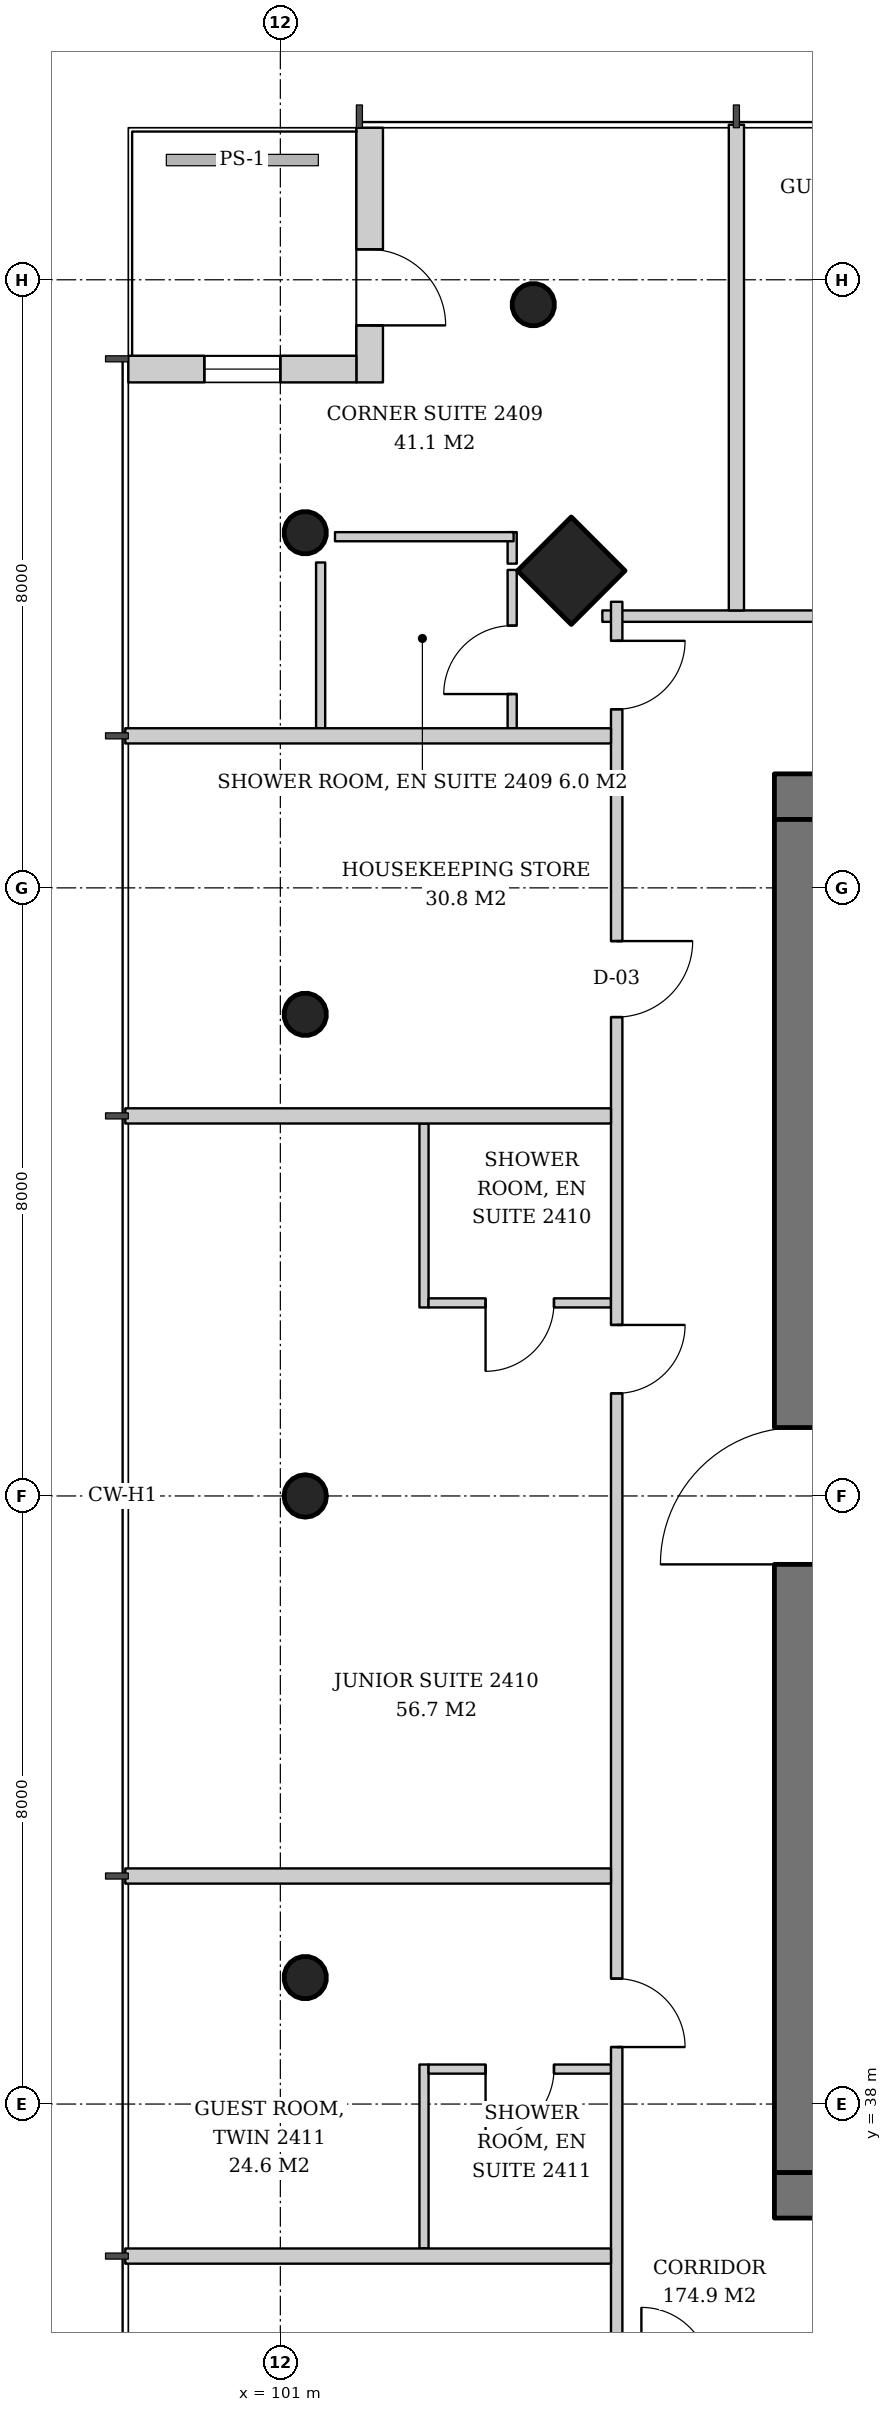
"""IFC4 building model, lengths in metres.
Left out: names, types, materials, properties, quantities, classifications, styles, units other than length and angle.
Written with IfcOpenShell. Run it as: python <this file> out.ifc"""

import sys

from ifc_helpers import new_model, si_unit, direction, frame, frame_2d, origin, origin_2d, place, context, subcontext, project, spatial, rectangle, hollow_circle, extrude, element, fill, save


model = new_model("IFC4")
c1 = context("Model", 3, precision=1e-05, world=origin(), true_north=direction((0.0, 1.0)))
c2 = subcontext(c1, "Body", "Model", "MODEL_VIEW")
j1 = project(units=[si_unit("LENGTHUNIT", "METRE"), si_unit("PLANEANGLEUNIT", "RADIAN")], contexts=[c1])
p1 = place(None, origin())
s1 = spatial("IfcSite", under=j1, at=p1, CompositionType="ELEMENT")
p2 = place(p1, origin())
s2 = spatial("IfcBuilding", under=s1, at=p2, CompositionType="ELEMENT")
p3 = place(p2, frame((0.0, 0.0, 97.0)))
s3 = spatial("IfcBuildingStorey", under=s2, at=p3, CompositionType="ELEMENT", Elevation=97.0)
p4 = place(p3, frame((104.776, 58.224, 0.0), z_axis=(0.043029647111, -0.043029647111, 0.998146732169), x_axis=(0.707106781187, 0.707106781187, 0.0)))
e1 = element("IfcColumn", 1, at=p4, inside=s3, PredefinedType="COLUMN", context=c2, shape_type="SweptSolid", body=[
    extrude(rectangle(XDim=1.0, YDim=1.0, at=origin_2d()), origin(), (0.0, 0.0, 1.0), 3.807),
])
for number, where, z_axis, x_axis in (
    (2, (104.276, 61.724, 0.0), (0.043, -0.043, 0.998), (0.707, 0.707, 0.0)),
    (3, (101.276, 58.724, 0.0), (0.043, -0.043, 0.998), (0.707, 0.707, 0.0)),
):
    element("IfcColumn", number, at=place(p3, frame(where, z_axis=z_axis, x_axis=x_axis)), inside=s3, PredefinedType="COLUMN", context=c2, shape_type="SweptSolid", body=[
        extrude(hollow_circle(Radius=0.28, WallThickness=0.02, at=origin_2d()), origin(), (0.0, 0.0, 1.0), 3.807),
    ])
p5 = place(p3, frame((101.276, 52.362, 0.0), z_axis=(0.043059584825, -0.021497706284, 0.998841188968), x_axis=(0.446680166538, 0.894693706707, 0.0)))
e4 = element("IfcColumn", 4, at=p5, inside=s3, PredefinedType="COLUMN", context=c2, shape_type="SweptSolid", body=[
    extrude(hollow_circle(Radius=0.28, WallThickness=0.02, at=origin_2d()), origin(), (0.0, 0.0, 1.0), 3.804),
])
p6 = place(p3, frame((101.276, 46.0, 0.0), z_axis=(0.043069538298, 0.0, 0.999072076915), x_axis=(0.0, 1.0, 0.0)))
e5 = element("IfcColumn", 5, at=p6, inside=s3, PredefinedType="COLUMN", context=c2, shape_type="SweptSolid", body=[
    extrude(hollow_circle(Radius=0.28, WallThickness=0.02, at=origin_2d()), origin(), (0.0, 0.0, 1.0), 3.803),
])
p7 = place(p3, frame((101.276, 39.638, 0.0), z_axis=(0.043059584825, 0.021497706284, 0.998841188968), x_axis=(-0.446680166538, 0.894693706707, 0.0)))
e6 = element("IfcColumn", 6, at=p7, inside=s3, PredefinedType="COLUMN", context=c2, shape_type="SweptSolid", body=[
    extrude(hollow_circle(Radius=0.28, WallThickness=0.02, at=origin_2d()), origin(), (0.0, 0.0, 1.0), 3.804),
])
p8 = place(p3, frame((107.5, 36.8, 0.0), z_axis=(0.0, 0.0, 1.0), x_axis=(1.0, 0.0, 0.0)))
e7 = element("IfcWall", 7, at=p8, inside=s3, PredefinedType="SHEAR", context=c2, shape_type="SweptSolid", body=[
    extrude(rectangle(XDim=19.0, YDim=0.6, at=frame_2d((9.5, 0.0))), origin(), (0.0, 0.0, 1.0), 3.8),
])
p9 = place(p8, frame((3.9, 0.0, 0.0)))
e8 = element("IfcOpeningElement", 8, at=p9, cuts=e7, PredefinedType="OPENING", context=c2, shape_type="SweptSolid", body=[
    extrude(rectangle(XDim=1.0, YDim=2.1, at=frame_2d((0.5, 1.05))), frame((0.0, 0.31, 0.0), z_axis=(0.0, -1.0, 0.0), x_axis=(1.0, 0.0, 0.0)), (0.0, 0.0, 1.0), 0.62),
])
p10 = place(p8, frame((14.153, 0.0, 0.0)))
e9 = element("IfcOpeningElement", 9, at=p10, cuts=e7, PredefinedType="OPENING", context=c2, shape_type="SweptSolid", body=[
    extrude(rectangle(XDim=1.0, YDim=2.1, at=frame_2d((0.5, 1.05))), frame((0.0, 0.31, 0.0), z_axis=(0.0, -1.0, 0.0), x_axis=(1.0, 0.0, 0.0)), (0.0, 0.0, 1.0), 0.62),
])
p11 = place(p8, frame((16.2, 0.0, 0.0)))
e10 = element("IfcOpeningElement", 10, at=p11, cuts=e7, PredefinedType="OPENING", context=c2, shape_type="SweptSolid", body=[
    extrude(rectangle(XDim=1.0, YDim=2.1, at=frame_2d((0.5, 1.05))), frame((0.0, 0.31, 0.0), z_axis=(0.0, -1.0, 0.0), x_axis=(1.0, 0.0, 0.0)), (0.0, 0.0, 1.0), 0.62),
])
p12 = place(p3, frame((107.5, 55.2, 0.0), z_axis=(0.0, 0.0, 1.0), x_axis=(1.0, 0.0, 0.0)))
e11 = element("IfcWall", 11, at=p12, inside=s3, PredefinedType="SHEAR", context=c2, shape_type="SweptSolid", body=[
    extrude(rectangle(XDim=19.0, YDim=0.6, at=frame_2d((9.5, 0.0))), origin(), (0.0, 0.0, 1.0), 3.8),
])
p13 = place(p12, frame((14.14, 0.0, 0.0)))
e12 = element("IfcOpeningElement", 12, at=p13, cuts=e11, PredefinedType="OPENING", context=c2, shape_type="SweptSolid", body=[
    extrude(rectangle(XDim=1.0, YDim=2.1, at=frame_2d((0.5, 1.05))), frame((0.0, 0.31, 0.0), z_axis=(0.0, -1.0, 0.0), x_axis=(1.0, 0.0, 0.0)), (0.0, 0.0, 1.0), 0.62),
])
p14 = place(p12, frame((2.425, 0.0, 0.0)))
e13 = element("IfcOpeningElement", 13, at=p14, cuts=e11, PredefinedType="OPENING", context=c2, shape_type="SweptSolid", body=[
    extrude(rectangle(XDim=1.0, YDim=2.1, at=frame_2d((0.5, 1.05))), frame((0.0, 0.31, 0.0), z_axis=(0.0, -1.0, 0.0), x_axis=(1.0, 0.0, 0.0)), (0.0, 0.0, 1.0), 0.62),
])
p15 = place(p3, frame((107.8, 37.1, 0.0), z_axis=(0.0, 0.0, 1.0), x_axis=(0.0, 1.0, 0.0)))
e14 = element("IfcWall", 14, at=p15, inside=s3, PredefinedType="SHEAR", context=c2, shape_type="SweptSolid", body=[
    extrude(rectangle(XDim=17.8, YDim=0.6, at=frame_2d((8.9, 0.0))), origin(), (0.0, 0.0, 1.0), 3.8),
])
p16 = place(p15, frame((8.0, 0.0, 0.0)))
e15 = element("IfcOpeningElement", 15, at=p16, cuts=e14, PredefinedType="OPENING", context=c2, shape_type="SweptSolid", body=[
    extrude(rectangle(XDim=1.8, YDim=2.4, at=frame_2d((0.9, 1.2))), frame((0.0, 0.31, 0.0), z_axis=(0.0, -1.0, 0.0), x_axis=(1.0, 0.0, 0.0)), (0.0, 0.0, 1.0), 0.62),
])
p17 = place(p3, frame((102.175, 64.0, 0.0), z_axis=(0.0, 0.0, 1.0), x_axis=(0.0, -1.0, 0.0)))
e16 = element("IfcWall", 16, at=p17, inside=s3, PredefinedType="SOLIDWALL", context=c2, shape_type="SweptSolid", body=[
    extrude(rectangle(XDim=3.35, YDim=0.35, at=frame_2d((1.675, 0.0))), origin(), (0.0, 0.0, 1.0), 3.6),
])
p18 = place(p17, frame((1.6, 0.0, 0.0)))
e17 = element("IfcOpeningElement", 17, at=p18, cuts=e16, PredefinedType="OPENING", context=c2, shape_type="SweptSolid", body=[
    extrude(rectangle(XDim=1.0, YDim=2.4, at=frame_2d((0.5, 1.2))), frame((0.0, 0.185, 0.0), z_axis=(0.0, -1.0, 0.0), x_axis=(1.0, 0.0, 0.0)), (0.0, 0.0, 1.0), 0.37),
])
p19 = place(p3, frame((102.0, 60.825, 0.0), z_axis=(0.0, 0.0, 1.0), x_axis=(-1.0, 0.0, 0.0)))
e18 = element("IfcWall", 18, at=p19, inside=s3, PredefinedType="SOLIDWALL", context=c2, shape_type="SweptSolid", body=[
    extrude(rectangle(XDim=3.0, YDim=0.35, at=frame_2d((1.5, 0.0))), origin(), (0.0, 0.0, 1.0), 3.6),
])
p20 = place(p19, frame((1.0, 0.0, 0.9)))
e19 = element("IfcOpeningElement", 19, at=p20, cuts=e18, PredefinedType="OPENING", context=c2, shape_type="SweptSolid", body=[
    extrude(rectangle(XDim=1.0, YDim=2.4, at=frame_2d((0.5, 1.2))), frame((0.0, 0.185, 0.0), z_axis=(0.0, -1.0, 0.0), x_axis=(1.0, 0.0, 0.0)), (0.0, 0.0, 1.0), 0.37),
])
p21 = place(p3, frame((128.764, 57.575, 0.0), z_axis=(0.0, 0.0, 1.0), x_axis=(-1.0, 0.0, 0.0)))
e20 = element("IfcWall", 20, at=p21, inside=s3, PredefinedType="PARTITIONING", context=c2, shape_type="SweptSolid", body=[
    extrude(rectangle(XDim=23.527, YDim=0.15, at=frame_2d((11.764, 0.0))), origin(), (0.0, 0.0, 1.0), 2.9),
])
p22 = place(p21, frame((0.514, 0.0, 0.0)))
e21 = element("IfcOpeningElement", 21, at=p22, cuts=e20, PredefinedType="OPENING", context=c2, shape_type="SweptSolid", body=[
    extrude(rectangle(XDim=0.9, YDim=2.1, at=frame_2d((0.45, 1.05))), frame((0.0, 0.085, 0.0), z_axis=(0.0, -1.0, 0.0), x_axis=(1.0, 0.0, 0.0)), (0.0, 0.0, 1.0), 0.17),
])
p23 = place(p21, frame((3.114, 0.0, 0.0)))
e22 = element("IfcOpeningElement", 22, at=p23, cuts=e20, PredefinedType="OPENING", context=c2, shape_type="SweptSolid", body=[
    extrude(rectangle(XDim=0.9, YDim=2.1, at=frame_2d((0.45, 1.05))), frame((0.0, 0.085, 0.0), z_axis=(0.0, -1.0, 0.0), x_axis=(1.0, 0.0, 0.0)), (0.0, 0.0, 1.0), 0.17),
])
p24 = place(p21, frame((9.514, 0.0, 0.0)))
e23 = element("IfcOpeningElement", 23, at=p24, cuts=e20, PredefinedType="OPENING", context=c2, shape_type="SweptSolid", body=[
    extrude(rectangle(XDim=0.9, YDim=2.1, at=frame_2d((0.45, 1.05))), frame((0.0, 0.085, 0.0), z_axis=(0.0, -1.0, 0.0), x_axis=(1.0, 0.0, 0.0)), (0.0, 0.0, 1.0), 0.17),
])
p25 = place(p21, frame((13.114, 0.0, 0.0)))
e24 = element("IfcOpeningElement", 24, at=p25, cuts=e20, PredefinedType="OPENING", context=c2, shape_type="SweptSolid", body=[
    extrude(rectangle(XDim=0.9, YDim=2.1, at=frame_2d((0.45, 1.05))), frame((0.0, 0.085, 0.0), z_axis=(0.0, -1.0, 0.0), x_axis=(1.0, 0.0, 0.0)), (0.0, 0.0, 1.0), 0.17),
])
p26 = place(p21, frame((19.514, 0.0, 0.0)))
e25 = element("IfcOpeningElement", 25, at=p26, cuts=e20, PredefinedType="OPENING", context=c2, shape_type="SweptSolid", body=[
    extrude(rectangle(XDim=0.9, YDim=2.1, at=frame_2d((0.45, 1.05))), frame((0.0, 0.085, 0.0), z_axis=(0.0, -1.0, 0.0), x_axis=(1.0, 0.0, 0.0)), (0.0, 0.0, 1.0), 0.17),
])
p27 = place(p3, frame((107.0, 57.65, 0.0), z_axis=(0.0, 0.0, 1.0), x_axis=(0.0, 1.0, 0.0)))
e26 = element("IfcWall", 26, at=p27, inside=s3, PredefinedType="PARTITIONING", context=c2, shape_type="SweptSolid", body=[
    extrude(rectangle(XDim=6.39, YDim=0.2, at=frame_2d((3.195, 0.0))), origin(), (0.0, 0.0, 1.0), 3.2),
])
p28 = place(p3, frame((104.05, 56.1, 0.0), z_axis=(0.0, 0.0, 1.0), x_axis=(0.0, 1.0, 0.0)))
e27 = element("IfcWall", 27, at=p28, inside=s3, PredefinedType="PARTITIONING", context=c2, shape_type="SweptSolid", body=[
    extrude(rectangle(XDim=2.083, YDim=0.12, at=frame_2d((1.042, 0.0))), origin(), (0.0, 0.0, 1.0), 3.2),
])
p29 = place(p28, frame((0.45, 0.0, 0.0)))
e28 = element("IfcOpeningElement", 28, at=p29, cuts=e27, PredefinedType="OPENING", context=c2, shape_type="SweptSolid", body=[
    extrude(rectangle(XDim=0.9, YDim=2.1, at=frame_2d((0.45, 1.05))), frame((0.0, 0.07, 0.0), z_axis=(0.0, -1.0, 0.0), x_axis=(1.0, 0.0, 0.0)), (0.0, 0.0, 1.0), 0.14),
])
p30 = place(p3, frame((104.05, 58.265, 0.0), z_axis=(0.0, 0.0, 1.0), x_axis=(0.0, 1.0, 0.0)))
e29 = element("IfcWall", 29, at=p30, inside=s3, PredefinedType="PARTITIONING", context=c2, shape_type="SweptSolid", body=[
    extrude(rectangle(XDim=0.415, YDim=0.12, at=frame_2d((0.207, 0.0))), origin(), (0.0, 0.0, 1.0), 3.2),
])
p31 = place(p3, frame((101.53, 56.1, 0.0), z_axis=(0.0, 0.0, 1.0), x_axis=(0.0, 1.0, 0.0)))
e30 = element("IfcWall", 30, at=p31, inside=s3, PredefinedType="PARTITIONING", context=c2, shape_type="SweptSolid", body=[
    extrude(rectangle(XDim=2.181, YDim=0.12, at=frame_2d((1.09, 0.0))), origin(), (0.0, 0.0, 1.0), 3.2),
])
p32 = place(p3, frame((104.069, 58.62, 0.0), z_axis=(0.0, 0.0, 1.0), x_axis=(-1.0, 0.0, 0.0)))
e31 = element("IfcWall", 31, at=p32, inside=s3, PredefinedType="PARTITIONING", context=c2, shape_type="SweptSolid", body=[
    extrude(rectangle(XDim=2.35, YDim=0.12, at=frame_2d((1.175, 0.0))), origin(), (0.0, 0.0, 1.0), 3.2),
])
p33 = place(p3, frame((102.89, 50.9, 0.0), z_axis=(0.0, 0.0, 1.0), x_axis=(0.0, -1.0, 0.0)))
e32 = element("IfcWall", 32, at=p33, inside=s3, PredefinedType="PARTITIONING", context=c2, shape_type="SweptSolid", body=[
    extrude(rectangle(XDim=2.42, YDim=0.12, at=frame_2d((1.21, 0.0))), origin(), (0.0, 0.0, 1.0), 3.6),
])
p34 = place(p3, frame((105.35, 48.54, 0.0), z_axis=(0.0, 0.0, 1.0), x_axis=(-1.0, 0.0, 0.0)))
e33 = element("IfcWall", 33, at=p34, inside=s3, PredefinedType="PARTITIONING", context=c2, shape_type="SweptSolid", body=[
    extrude(rectangle(XDim=2.4, YDim=0.12, at=frame_2d((1.2, 0.0))), origin(), (0.0, 0.0, 1.0), 3.6),
])
p35 = place(p34, frame((0.75, 0.0, 0.0)))
e34 = element("IfcOpeningElement", 34, at=p35, cuts=e33, PredefinedType="OPENING", context=c2, shape_type="SweptSolid", body=[
    extrude(rectangle(XDim=0.9, YDim=2.1, at=frame_2d((0.45, 1.05))), frame((0.0, 0.07, 0.0), z_axis=(0.0, -1.0, 0.0), x_axis=(1.0, 0.0, 0.0)), (0.0, 0.0, 1.0), 0.14),
])
p36 = place(p3, frame((102.89, 38.52, 0.0), z_axis=(0.0, 0.0, 1.0), x_axis=(0.0, -1.0, 0.0)))
e35 = element("IfcWall", 35, at=p36, inside=s3, PredefinedType="PARTITIONING", context=c2, shape_type="SweptSolid", body=[
    extrude(rectangle(XDim=2.42, YDim=0.12, at=frame_2d((1.21, 0.0))), origin(), (0.0, 0.0, 1.0), 3.6),
])
p37 = place(p3, frame((105.35, 38.46, 0.0), z_axis=(0.0, 0.0, 1.0), x_axis=(-1.0, 0.0, 0.0)))
e36 = element("IfcWall", 36, at=p37, inside=s3, PredefinedType="PARTITIONING", context=c2, shape_type="SweptSolid", body=[
    extrude(rectangle(XDim=2.4, YDim=0.12, at=frame_2d((1.2, 0.0))), origin(), (0.0, 0.0, 1.0), 3.6),
])
p38 = place(p37, frame((0.75, 0.0, 0.0)))
e37 = element("IfcOpeningElement", 37, at=p38, cuts=e36, PredefinedType="OPENING", context=c2, shape_type="SweptSolid", body=[
    extrude(rectangle(XDim=0.9, YDim=2.1, at=frame_2d((0.45, 1.05))), frame((0.0, 0.07, 0.0), z_axis=(0.0, -1.0, 0.0), x_axis=(1.0, 0.0, 0.0)), (0.0, 0.0, 1.0), 0.14),
])
p39 = place(p3, frame((105.425, 57.764, 0.0), z_axis=(0.0, 0.0, 1.0), x_axis=(0.0, -1.0, 0.0)))
e38 = element("IfcWall", 38, at=p39, inside=s3, PredefinedType="PARTITIONING", context=c2, shape_type="SweptSolid", body=[
    extrude(rectangle(XDim=23.527, YDim=0.15, at=frame_2d((11.764, 0.0))), origin(), (0.0, 0.0, 1.0), 2.9),
])
p40 = place(p39, frame((0.514, 0.0, 0.0)))
e39 = element("IfcOpeningElement", 39, at=p40, cuts=e38, PredefinedType="OPENING", context=c2, shape_type="SweptSolid", body=[
    extrude(rectangle(XDim=0.9, YDim=2.1, at=frame_2d((0.45, 1.05))), frame((0.0, 0.085, 0.0), z_axis=(0.0, -1.0, 0.0), x_axis=(1.0, 0.0, 0.0)), (0.0, 0.0, 1.0), 0.17),
])
p41 = place(p39, frame((4.464, 0.0, 0.0)))
e40 = element("IfcOpeningElement", 40, at=p41, cuts=e38, PredefinedType="OPENING", context=c2, shape_type="SweptSolid", body=[
    extrude(rectangle(XDim=1.0, YDim=2.1, at=frame_2d((0.5, 1.05))), frame((0.0, 0.085, 0.0), z_axis=(0.0, -1.0, 0.0), x_axis=(1.0, 0.0, 0.0)), (0.0, 0.0, 1.0), 0.17),
])
p42 = place(p39, frame((9.514, 0.0, 0.0)))
e41 = element("IfcOpeningElement", 41, at=p42, cuts=e38, PredefinedType="OPENING", context=c2, shape_type="SweptSolid", body=[
    extrude(rectangle(XDim=0.9, YDim=2.1, at=frame_2d((0.45, 1.05))), frame((0.0, 0.085, 0.0), z_axis=(0.0, -1.0, 0.0), x_axis=(1.0, 0.0, 0.0)), (0.0, 0.0, 1.0), 0.17),
])
p43 = place(p39, frame((18.114, 0.0, 0.0)))
e42 = element("IfcOpeningElement", 42, at=p43, cuts=e38, PredefinedType="OPENING", context=c2, shape_type="SweptSolid", body=[
    extrude(rectangle(XDim=0.9, YDim=2.1, at=frame_2d((0.45, 1.05))), frame((0.0, 0.085, 0.0), z_axis=(0.0, -1.0, 0.0), x_axis=(1.0, 0.0, 0.0)), (0.0, 0.0, 1.0), 0.17),
])
p44 = place(p3, frame((105.35, 56.0, 0.0), z_axis=(0.0, 0.0, 1.0), x_axis=(-1.0, 0.0, 0.0)))
e43 = element("IfcWall", 43, at=p44, inside=s3, PredefinedType="PARTITIONING", context=c2, shape_type="SweptSolid", body=[
    extrude(rectangle(XDim=6.39, YDim=0.2, at=frame_2d((3.195, 0.0))), origin(), (0.0, 0.0, 1.0), 3.2),
])
p45 = place(p3, frame((105.35, 51.0, 0.0), z_axis=(0.0, 0.0, 1.0), x_axis=(-1.0, 0.0, 0.0)))
e44 = element("IfcWall", 44, at=p45, inside=s3, PredefinedType="PARTITIONING", context=c2, shape_type="SweptSolid", body=[
    extrude(rectangle(XDim=6.39, YDim=0.2, at=frame_2d((3.195, 0.0))), origin(), (0.0, 0.0, 1.0), 3.0),
])
for number, where, z_axis, x_axis in (
    (45, (105.35, 41.0, 0.0), (0.0, 0.0, 1.0), (-1.0, 0.0, 0.0)),
    (46, (105.35, 36.0, 0.0), (0.0, 0.0, 1.0), (-1.0, 0.0, 0.0)),
):
    element("IfcWall", number, at=place(p3, frame(where, z_axis=z_axis, x_axis=x_axis)), inside=s3, PredefinedType="PARTITIONING", context=c2, shape_type="SweptSolid", body=[
        extrude(rectangle(XDim=6.39, YDim=0.2, at=frame_2d((3.195, 0.0))), origin(), (0.0, 0.0, 1.0), 3.2),
    ])
p46 = place(p18, origin())
e47 = element("IfcDoor", 47, at=p46, inside=s3, OperationType="SINGLE_SWING_RIGHT", PredefinedType="DOOR", context=c2, shape_type="SweptSolid", body=[
    extrude(rectangle(XDim=1.0, YDim=2.4, at=frame_2d((0.5, 1.2))), frame((0.0, 0.025, 0.0), z_axis=(0.0, -1.0, 0.0), x_axis=(1.0, 0.0, 0.0)), (0.0, 0.0, 1.0), 0.05),
])
fill(e17, e47)
p47 = place(p20, origin())
e48 = element("IfcWindow", 48, at=p47, inside=s3, PartitioningType="SINGLE_PANEL", PredefinedType="WINDOW", context=c2, shape_type="SweptSolid", body=[
    extrude(rectangle(XDim=1.0, YDim=2.4, at=frame_2d((0.5, 1.2))), frame((0.0, 0.03, 0.0), z_axis=(0.0, -1.0, 0.0), x_axis=(1.0, 0.0, 0.0)), (0.0, 0.0, 1.0), 0.06),
])
fill(e19, e48)
p48 = place(p16, origin())
e49 = element("IfcDoor", 49, at=p48, inside=s3, OperationType="DOUBLE_DOOR_SINGLE_SWING", PredefinedType="DOOR", context=c2, shape_type="SweptSolid", body=[
    extrude(rectangle(XDim=1.8, YDim=2.4, at=frame_2d((0.9, 1.2))), frame((0.0, 0.025, 0.0), z_axis=(0.0, -1.0, 0.0), x_axis=(1.0, 0.0, 0.0)), (0.0, 0.0, 1.0), 0.05),
])
fill(e15, e49)
p49 = place(p29, origin())
e50 = element("IfcDoor", 50, at=p49, inside=s3, OperationType="SINGLE_SWING_LEFT", PredefinedType="DOOR", context=c2, shape_type="SweptSolid", body=[
    extrude(rectangle(XDim=0.9, YDim=2.1, at=frame_2d((0.45, 1.05))), frame((0.0, 0.025, 0.0), z_axis=(0.0, -1.0, 0.0), x_axis=(1.0, 0.0, 0.0)), (0.0, 0.0, 1.0), 0.05),
])
fill(e28, e50)
p50 = place(p35, origin())
e51 = element("IfcDoor", 51, at=p50, inside=s3, OperationType="SINGLE_SWING_RIGHT", PredefinedType="DOOR", context=c2, shape_type="SweptSolid", body=[
    extrude(rectangle(XDim=0.9, YDim=2.1, at=frame_2d((0.45, 1.05))), frame((0.0, 0.025, 0.0), z_axis=(0.0, -1.0, 0.0), x_axis=(1.0, 0.0, 0.0)), (0.0, 0.0, 1.0), 0.05),
])
fill(e34, e51)
p51 = place(p38, origin())
e52 = element("IfcDoor", 52, at=p51, inside=s3, OperationType="SINGLE_SWING_RIGHT", PredefinedType="DOOR", context=c2, shape_type="SweptSolid", body=[
    extrude(rectangle(XDim=0.9, YDim=2.1, at=frame_2d((0.45, 1.05))), frame((0.0, 0.025, 0.0), z_axis=(0.0, -1.0, 0.0), x_axis=(1.0, 0.0, 0.0)), (0.0, 0.0, 1.0), 0.05),
])
fill(e37, e52)
p52 = place(p40, origin())
e53 = element("IfcDoor", 53, at=p52, inside=s3, OperationType="SINGLE_SWING_LEFT", PredefinedType="DOOR", context=c2, shape_type="SweptSolid", body=[
    extrude(rectangle(XDim=0.9, YDim=2.1, at=frame_2d((0.45, 1.05))), frame((0.0, 0.025, 0.0), z_axis=(0.0, -1.0, 0.0), x_axis=(1.0, 0.0, 0.0)), (0.0, 0.0, 1.0), 0.05),
])
fill(e39, e53)
p53 = place(p41, origin())
e54 = element("IfcDoor", 54, at=p53, inside=s3, OperationType="SINGLE_SWING_LEFT", PredefinedType="DOOR", context=c2, shape_type="SweptSolid", body=[
    extrude(rectangle(XDim=1.0, YDim=2.1, at=frame_2d((0.5, 1.05))), frame((0.0, 0.025, 0.0), z_axis=(0.0, -1.0, 0.0), x_axis=(1.0, 0.0, 0.0)), (0.0, 0.0, 1.0), 0.05),
])
fill(e40, e54)
p54 = place(p42, origin())
e55 = element("IfcDoor", 55, at=p54, inside=s3, OperationType="SINGLE_SWING_LEFT", PredefinedType="DOOR", context=c2, shape_type="SweptSolid", body=[
    extrude(rectangle(XDim=0.9, YDim=2.1, at=frame_2d((0.45, 1.05))), frame((0.0, 0.025, 0.0), z_axis=(0.0, -1.0, 0.0), x_axis=(1.0, 0.0, 0.0)), (0.0, 0.0, 1.0), 0.05),
])
fill(e41, e55)
p55 = place(p43, origin())
e56 = element("IfcDoor", 56, at=p55, inside=s3, OperationType="SINGLE_SWING_RIGHT", PredefinedType="DOOR", context=c2, shape_type="SweptSolid", body=[
    extrude(rectangle(XDim=0.9, YDim=2.1, at=frame_2d((0.45, 1.05))), frame((0.0, 0.025, 0.0), z_axis=(0.0, -1.0, 0.0), x_axis=(1.0, 0.0, 0.0)), (0.0, 0.0, 1.0), 0.05),
])
fill(e42, e56)
save(model, sys.argv[1])
